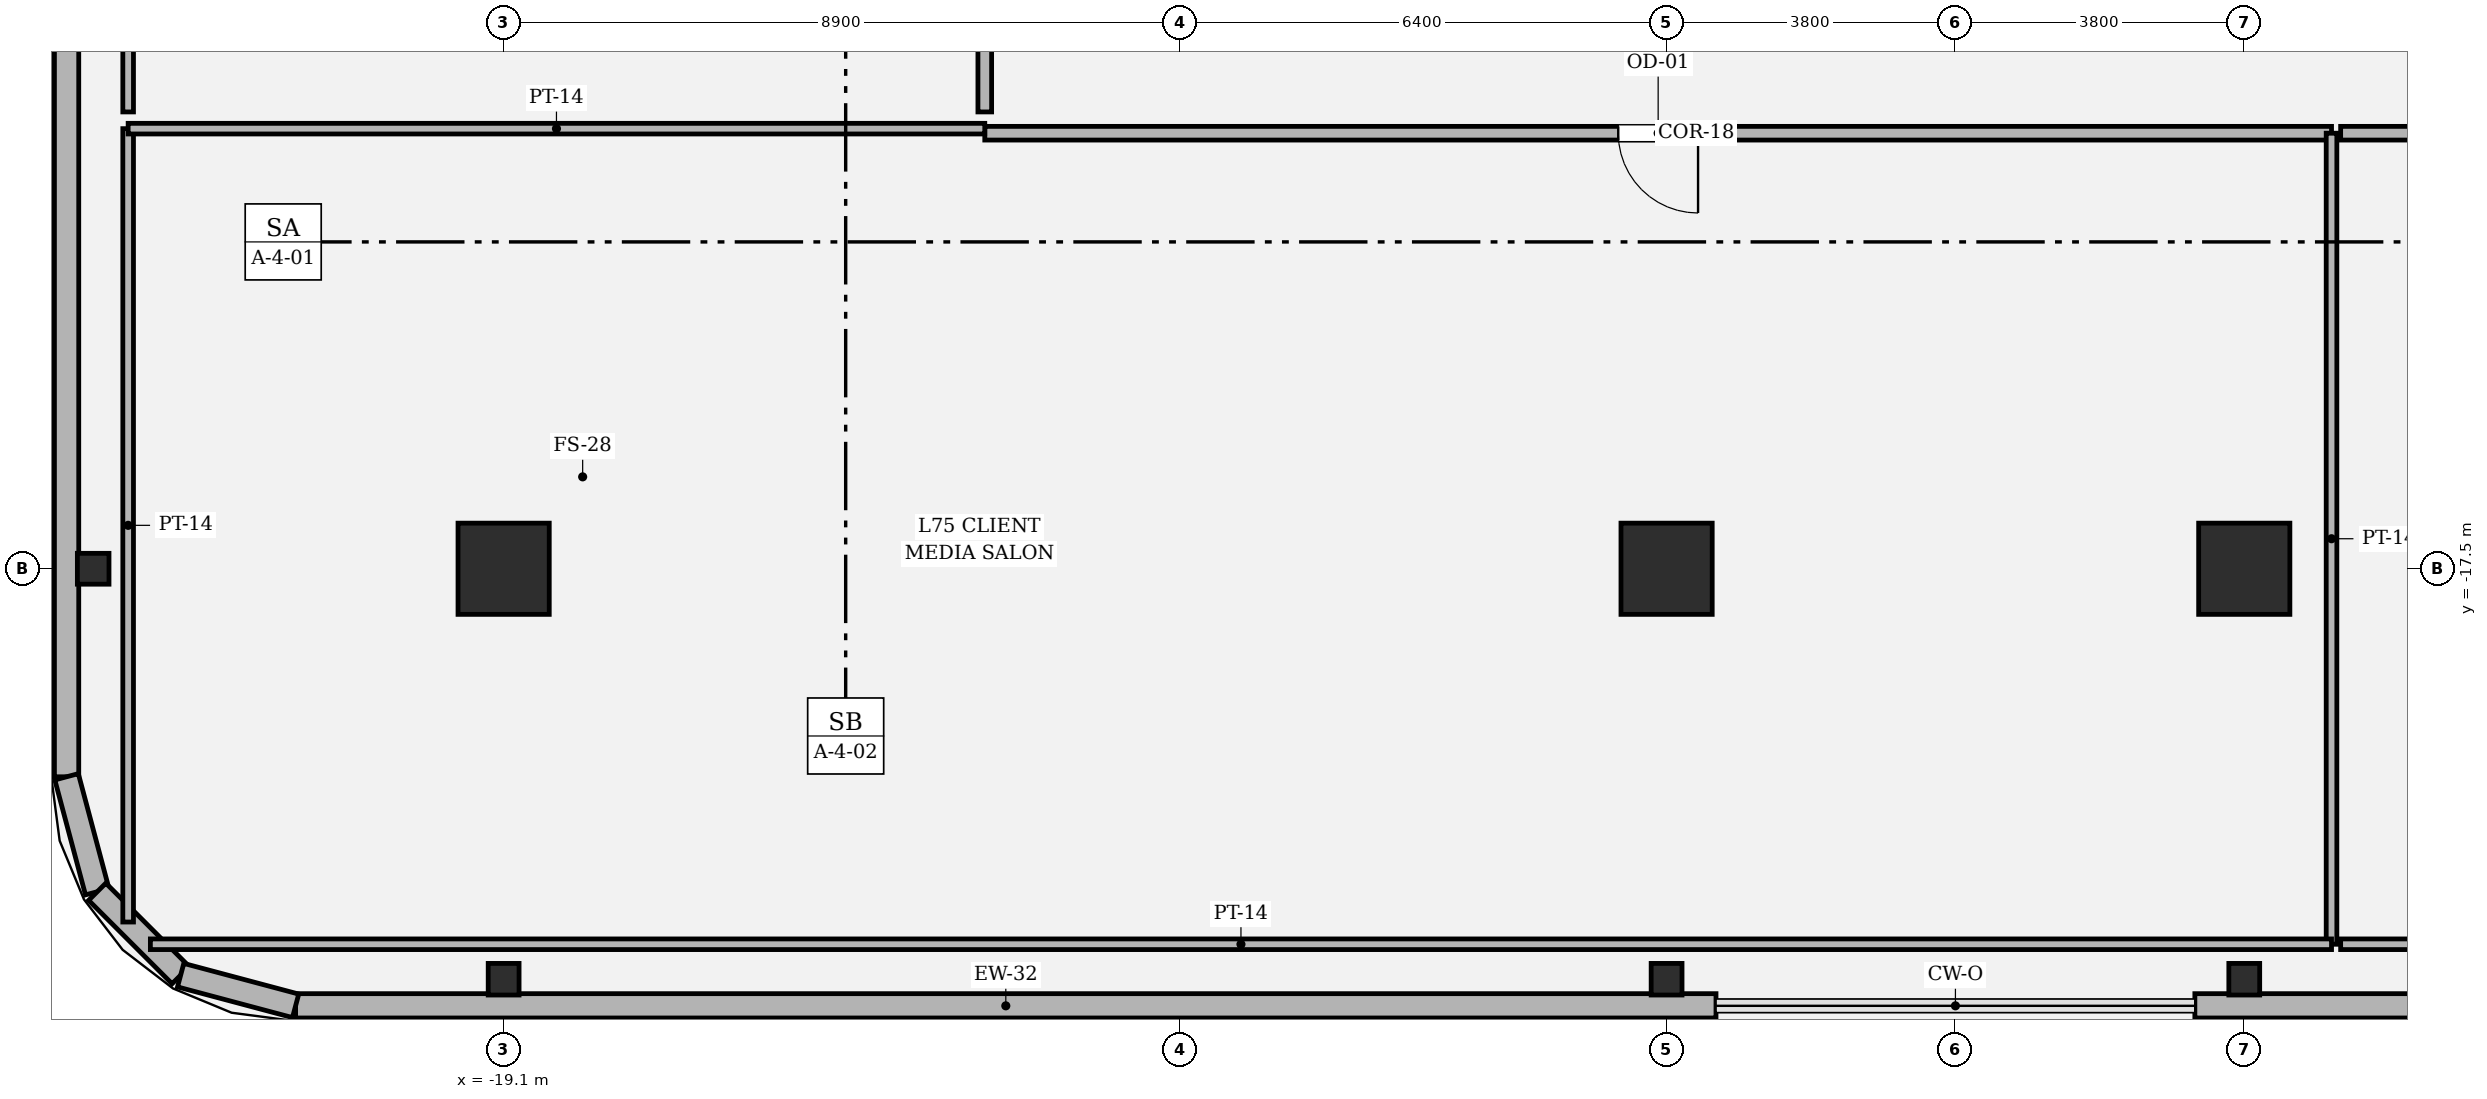
"""IFC4 building model, lengths in metres.
Left out: names, types, materials, properties, quantities, classifications, styles, units other than length and angle.
Written with IfcOpenShell. Run it as: python <this file> out.ifc"""

import sys

from ifc_helpers import new_model, si_unit, direction, frame, frame_2d, origin, origin_2d, place, context, subcontext, project, spatial, rectangle, hollow_rectangle, i_section, extrude, element, fill, save


model = new_model("IFC4")
c1 = context("Model", 3, precision=1e-05, world=origin(), true_north=direction((0.0, 1.0)))
c2 = subcontext(c1, "Body", "Model", "MODEL_VIEW")
j1 = project(units=[si_unit("LENGTHUNIT", "METRE"), si_unit("PLANEANGLEUNIT", "RADIAN")], contexts=[c1])
p1 = place(None, origin())
s1 = spatial("IfcSite", under=j1, at=p1, CompositionType="ELEMENT")
p2 = place(p1, origin())
s2 = spatial("IfcBuilding", under=s1, at=p2, CompositionType="ELEMENT")
p3 = place(p2, frame((0.0, 0.0, 317.4)))
s3 = spatial("IfcBuildingStorey", under=s2, at=p3, CompositionType="ELEMENT", Elevation=317.4)
for number, where, z_axis, x_axis in (
    (1, (-19.1, -17.5, 0.0), (0.0, 0.0, 1.0), (1.0, 0.0, 0.0)),
    (2, (-3.8, -17.5, 0.0), (0.0, 0.0, 1.0), (1.0, 0.0, 0.0)),
    (3, (3.8, -17.5, 0.0), (0.0, 0.0, 1.0), (1.0, 0.0, 0.0)),
):
    element("IfcColumn", number, at=place(p3, frame(where, z_axis=z_axis, x_axis=x_axis)), inside=s3, PredefinedType="COLUMN", context=c2, shape_type="SweptSolid", body=[
        extrude(hollow_rectangle(XDim=1.2, YDim=1.2, WallThickness=0.035, at=origin_2d()), origin(), (0.0, 0.0, 1.0), 4.2),
    ])
for number, where, z_axis, x_axis in (
    (4, (-19.1, -22.9, 0.0), (0.0, 0.0, 1.0), (1.0, 0.0, 0.0)),
    (5, (-3.8, -22.9, 0.0), (0.0, 0.0, 1.0), (1.0, 0.0, 0.0)),
    (6, (3.8, -22.9, 0.0), (0.0, 0.0, 1.0), (1.0, 0.0, 0.0)),
    (7, (-24.5, -17.5, 0.0), (0.0, 0.0, 1.0), (0.0, 1.0, 0.0)),
):
    element("IfcColumn", number, at=place(p3, frame(where, z_axis=z_axis, x_axis=x_axis)), inside=s3, PredefinedType="COLUMN", context=c2, shape_type="SweptSolid", body=[
        extrude(i_section(OverallWidth=0.406, OverallDepth=0.416, WebThickness=0.029, FlangeThickness=0.048, FilletRadius=0.018, at=origin_2d()), origin(), (0.0, 0.0, 1.0), 4.198),
    ])
p4 = place(p3, frame((-21.837, -23.25, 0.0), z_axis=(0.0, 0.0, 1.0), x_axis=(1.0, 0.0, 0.0)))
e8 = element("IfcWall", 8, at=p4, inside=s3, PredefinedType="SOLIDWALL", context=c2, shape_type="SweptSolid", body=[
    extrude(rectangle(XDim=18.687, YDim=0.32, at=frame_2d((9.344, 0.0))), origin(), (0.0, 0.0, 1.0), 2.714),
])
p5 = place(p3, frame((3.15, -23.25, 0.0), z_axis=(0.0, 0.0, 1.0), x_axis=(1.0, 0.0, 0.0)))
e9 = element("IfcWall", 9, at=p5, inside=s3, PredefinedType="SOLIDWALL", context=c2, shape_type="SweptSolid", body=[
    extrude(rectangle(XDim=13.887, YDim=0.32, at=frame_2d((6.943, 0.0))), origin(), (0.0, 0.0, 1.0), 2.714),
])
p6 = place(p3, frame((-24.85, -2.75, 0.0), z_axis=(0.0, 0.0, 1.0), x_axis=(0.0, -1.0, 0.0)))
e10 = element("IfcWall", 10, at=p6, inside=s3, PredefinedType="SOLIDWALL", context=c2, shape_type="SweptSolid", body=[
    extrude(rectangle(XDim=17.487, YDim=0.32, at=frame_2d((8.743, 0.0))), origin(), (0.0, 0.0, 1.0), 2.714),
])
p7 = place(p3, frame((-24.85, -20.237, 0.0), z_axis=(0.0, 0.0, 1.0), x_axis=(0.257847112249, -0.966185730957, 0.0)))
e11 = element("IfcWall", 11, at=p7, inside=s3, PredefinedType="SOLIDWALL", context=c2, shape_type="SweptSolid", body=[
    extrude(rectangle(XDim=1.565, YDim=0.32, at=frame_2d((0.783, 0.0))), origin(), (0.0, 0.0, 1.0), 4.0),
])
p8 = place(p3, frame((-24.447, -21.749, 0.0), z_axis=(0.0, 0.0, 1.0), x_axis=(0.707028130747, -0.707185422879, 0.0)))
e12 = element("IfcWall", 12, at=p8, inside=s3, PredefinedType="SOLIDWALL", context=c2, shape_type="SweptSolid", body=[
    extrude(rectangle(XDim=1.552, YDim=0.32, at=frame_2d((0.776, 0.0))), origin(), (0.0, 0.0, 1.0), 4.0),
])
p9 = place(p3, frame((-23.349, -22.847, 0.0), z_axis=(0.0, 0.0, 1.0), x_axis=(0.966224582397, -0.257701486942, 0.0)))
e13 = element("IfcWall", 13, at=p9, inside=s3, PredefinedType="SOLIDWALL", context=c2, shape_type="SweptSolid", body=[
    extrude(rectangle(XDim=1.565, YDim=0.32, at=frame_2d((0.783, 0.0))), origin(), (0.0, 0.0, 1.0), 4.0),
])
p10 = place(p3, frame((-12.77, -11.77, 0.0), z_axis=(0.0, 0.0, 1.0), x_axis=(1.0, 0.0, 0.0)))
e14 = element("IfcWall", 14, at=p10, inside=s3, PredefinedType="PARTITIONING", context=c2, shape_type="SweptSolid", body=[
    extrude(rectangle(XDim=17.718, YDim=0.18, at=frame_2d((8.859, 0.0))), origin(), (0.0, 0.0, 1.0), 3.394),
])
p11 = place(p10, frame((8.334, 0.0, 0.0)))
e15 = element("IfcOpeningElement", 15, at=p11, cuts=e14, PredefinedType="OPENING", context=c2, shape_type="SweptSolid", body=[
    extrude(rectangle(XDim=1.05, YDim=2.2, at=frame_2d((0.525, 1.1))), frame((0.0, 0.1, 0.0), z_axis=(0.0, -1.0, 0.0), x_axis=(1.0, 0.0, 0.0)), (0.0, 0.0, 1.0), 0.2),
])
p12 = place(p3, frame((4.948, -11.77, 0.0), z_axis=(0.0, 0.0, 1.0), x_axis=(0.0, -1.0, 0.0)))
e16 = element("IfcWall", 16, at=p12, inside=s3, PredefinedType="PARTITIONING", context=c2, shape_type="SweptSolid", body=[
    extrude(rectangle(XDim=10.67, YDim=0.14, at=frame_2d((5.335, 0.0))), origin(), (0.0, 0.0, 1.0), 3.394),
])
p13 = place(p3, frame((4.948, -22.44, 0.0), z_axis=(0.0, 0.0, 1.0), x_axis=(-1.0, 0.0, 0.0)))
e17 = element("IfcWall", 17, at=p13, inside=s3, PredefinedType="PARTITIONING", context=c2, shape_type="SweptSolid", body=[
    extrude(rectangle(XDim=28.696, YDim=0.14, at=frame_2d((14.348, 0.0))), origin(), (0.0, 0.0, 1.0), 2.674),
])
p14 = place(p3, frame((-24.04, -22.147, 0.0), z_axis=(0.0, 0.0, 1.0), x_axis=(0.0, 1.0, 0.0)))
e18 = element("IfcWall", 18, at=p14, inside=s3, PredefinedType="PARTITIONING", context=c2, shape_type="SweptSolid", body=[
    extrude(rectangle(XDim=10.438, YDim=0.14, at=frame_2d((5.219, 0.0))), origin(), (0.0, 0.0, 1.0), 2.674),
])
p15 = place(p3, frame((-24.04, -11.71, 0.0), z_axis=(0.0, 0.0, 1.0), x_axis=(1.0, 0.0, 0.0)))
e19 = element("IfcWall", 19, at=p15, inside=s3, PredefinedType="PARTITIONING", context=c2, shape_type="SweptSolid", body=[
    extrude(rectangle(XDim=11.27, YDim=0.14, at=frame_2d((5.635, 0.0))), origin(), (0.0, 0.0, 1.0), 3.394),
])
p16 = place(p3, frame((18.14, -22.44, 0.0), z_axis=(0.0, 0.0, 1.0), x_axis=(-1.0, 0.0, 0.0)))
e20 = element("IfcWall", 20, at=p16, inside=s3, PredefinedType="PARTITIONING", context=c2, shape_type="SweptSolid", body=[
    extrude(rectangle(XDim=13.072, YDim=0.14, at=frame_2d((6.536, 0.0))), origin(), (0.0, 0.0, 1.0), 4.0),
])
p17 = place(p3, frame((5.068, -11.77, 0.0), z_axis=(0.0, 0.0, 1.0), x_axis=(1.0, 0.0, 0.0)))
e21 = element("IfcWall", 21, at=p17, inside=s3, PredefinedType="PARTITIONING", context=c2, shape_type="SweptSolid", body=[
    extrude(rectangle(XDim=7.702, YDim=0.18, at=frame_2d((3.851, 0.0))), origin(), (0.0, 0.0, 1.0), 3.394),
])
p18 = place(p17, frame((3.151, 0.0, 0.0)))
e22 = element("IfcOpeningElement", 22, at=p18, cuts=e21, PredefinedType="OPENING", context=c2, shape_type="SweptSolid", body=[
    extrude(rectangle(XDim=1.4, YDim=2.25, at=frame_2d((0.7, 1.125))), frame((0.0, 0.1, 0.0), z_axis=(0.0, -1.0, 0.0), x_axis=(1.0, 0.0, 0.0)), (0.0, 0.0, 1.0), 0.2),
])
p19 = place(p3, frame((-12.77, -3.294, 0.0), z_axis=(0.0, 0.0, 1.0), x_axis=(0.0, -1.0, 0.0)))
e23 = element("IfcWall", 23, at=p19, inside=s3, PredefinedType="PARTITIONING", context=c2, shape_type="SweptSolid", body=[
    extrude(rectangle(XDim=8.196, YDim=0.18, at=frame_2d((4.098, 0.0))), origin(), (0.0, 0.0, 1.0), 3.394),
])
p20 = place(p19, frame((3.573, 0.0, 0.0)))
e24 = element("IfcOpeningElement", 24, at=p20, cuts=e23, PredefinedType="OPENING", context=c2, shape_type="SweptSolid", body=[
    extrude(rectangle(XDim=1.05, YDim=2.2, at=frame_2d((0.525, 1.1))), frame((0.0, 0.1, 0.0), z_axis=(0.0, -1.0, 0.0), x_axis=(1.0, 0.0, 0.0)), (0.0, 0.0, 1.0), 0.2),
])
p21 = place(p3, frame((-24.04, -11.49, 0.0), z_axis=(0.0, 0.0, 1.0), x_axis=(0.0, 1.0, 0.0)))
e25 = element("IfcWall", 25, at=p21, inside=s3, PredefinedType="PARTITIONING", context=c2, shape_type="SweptSolid", body=[
    extrude(rectangle(XDim=8.196, YDim=0.14, at=frame_2d((4.098, 0.0))), origin(), (0.0, 0.0, 1.0), 2.674),
])
p22 = place(p11, origin())
e26 = element("IfcDoor", 26, at=p22, inside=s3, OperationType="SINGLE_SWING_RIGHT", PredefinedType="DOOR", context=c2, shape_type="SweptSolid", body=[
    extrude(rectangle(XDim=1.05, YDim=2.2, at=frame_2d((0.525, 1.1))), frame((0.0, 0.025, 0.0), z_axis=(0.0, -1.0, 0.0), x_axis=(1.0, 0.0, 0.0)), (0.0, 0.0, 1.0), 0.05),
])
fill(e15, e26)
save(model, sys.argv[1])
